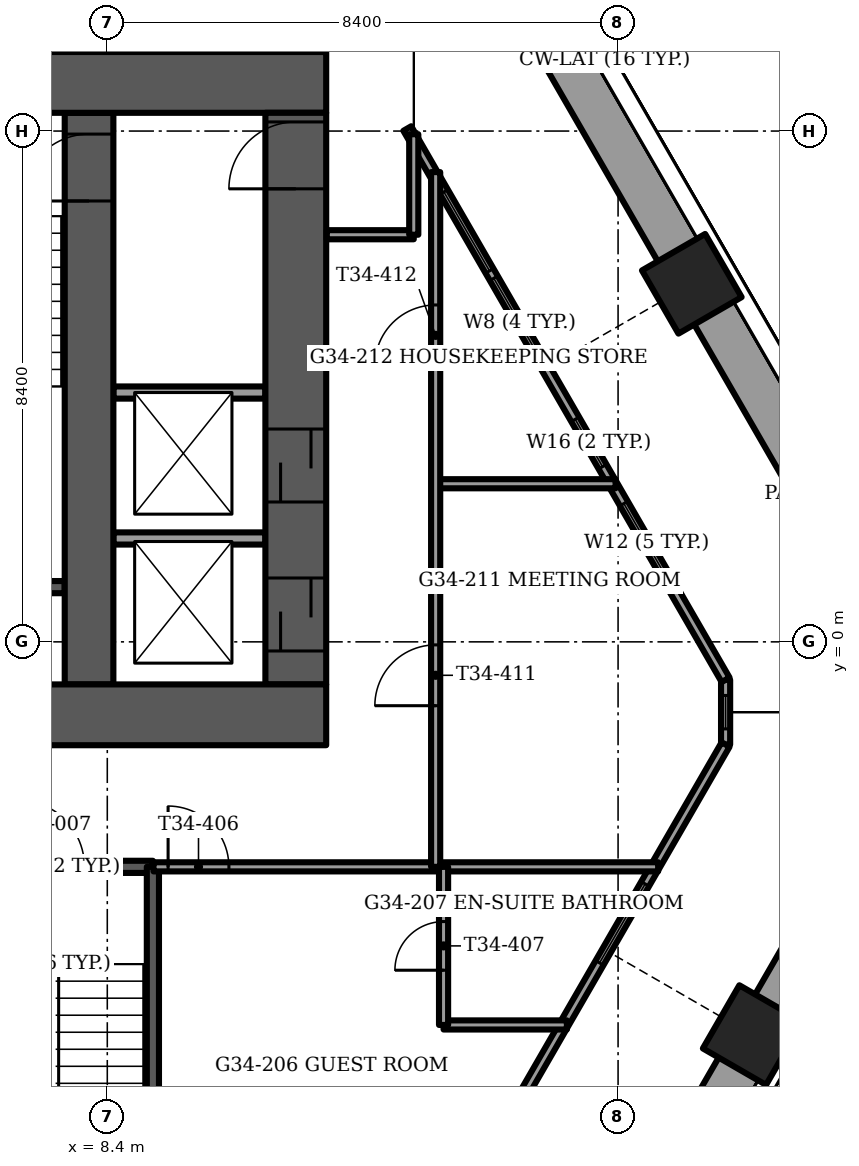
"""IFC4 building model, lengths in metres.
Left out: names, types, materials, properties, quantities, classifications, styles, units other than length and angle.
Written with IfcOpenShell. Run it as: python <this file> out.ifc"""

import sys

from ifc_helpers import new_model, si_unit, direction, frame, frame_2d, origin, origin_2d, place, context, subcontext, project, spatial, rectangle, extrude, element, fill, save


model = new_model("IFC4")
c1 = context("Model", 3, precision=1e-05, world=origin(), true_north=direction((0.0, 1.0)))
c2 = subcontext(c1, "Body", "Model", "MODEL_VIEW")
j1 = project(units=[si_unit("LENGTHUNIT", "METRE"), si_unit("PLANEANGLEUNIT", "RADIAN")], contexts=[c1])
p1 = place(None, origin())
s1 = spatial("IfcSite", under=j1, at=p1, CompositionType="ELEMENT")
p2 = place(p1, origin())
s2 = spatial("IfcBuilding", under=s1, at=p2, CompositionType="ELEMENT")
p3 = place(p2, frame((0.0, 0.0, 138.5)))
s3 = spatial("IfcBuildingStorey", under=s2, at=p3, CompositionType="ELEMENT", Elevation=138.5)
for number, where, z_axis, x_axis in (
    (1, (19.014, -6.467, -1.2), (0.0, 0.0, 1.0), (-0.5, -0.866, 0.0)),
    (2, (18.012, 5.888, -1.2), (0.0, 0.0, 1.0), (0.5, -0.866, 0.0)),
):
    element("IfcColumn", number, at=place(p3, frame(where, z_axis=z_axis, x_axis=x_axis)), inside=s3, PredefinedType="COLUMN", context=c2, shape_type="SweptSolid", body=[
        extrude(rectangle(XDim=1.2, YDim=1.2, at=origin_2d()), origin(), (0.0, 0.0, 1.0), 3.75),
    ])
p4 = place(p3, frame((-12.0, -1.2, -0.3), z_axis=(0.0, 0.0, 1.0), x_axis=(1.0, 0.0, 0.0)))
e3 = element("IfcWall", 3, at=p4, inside=s3, PredefinedType="SHEAR", context=c2, shape_type="SweptSolid", body=[
    extrude(rectangle(XDim=24.0, YDim=1.0, at=frame_2d((12.0, 0.0))), origin(), (0.0, 0.0, 1.0), 3.75),
])
p5 = place(p4, frame((11.2, 0.0, 0.0)))
e4 = element("IfcOpeningElement", 4, at=p5, cuts=e3, PredefinedType="OPENING", context=c2, shape_type="SweptSolid", body=[
    extrude(rectangle(XDim=1.6, YDim=2.1, at=frame_2d((0.8, 1.05))), frame((0.0, 0.5, 0.0), z_axis=(0.0, -1.0, 0.0), x_axis=(1.0, 0.0, 0.0)), (0.0, 0.0, 1.0), 1.0),
])
p6 = place(p3, frame((-12.0, 9.2, -0.3), z_axis=(0.0, 0.0, 1.0), x_axis=(1.0, 0.0, 0.0)))
e5 = element("IfcWall", 5, at=p6, inside=s3, PredefinedType="SHEAR", context=c2, shape_type="SweptSolid", body=[
    extrude(rectangle(XDim=24.0, YDim=1.0, at=frame_2d((12.0, 0.0))), origin(), (0.0, 0.0, 1.0), 3.75),
])
p7 = place(p6, frame((11.2, 0.0, 0.0)))
e6 = element("IfcOpeningElement", 6, at=p7, cuts=e5, PredefinedType="OPENING", context=c2, shape_type="SweptSolid", body=[
    extrude(rectangle(XDim=1.6, YDim=2.1, at=frame_2d((0.8, 1.05))), frame((0.0, 0.5, 0.0), z_axis=(0.0, -1.0, 0.0), x_axis=(1.0, 0.0, 0.0)), (0.0, 0.0, 1.0), 1.0),
])
p8 = place(p6, frame((5.25, 0.0, 0.0)))
e7 = element("IfcOpeningElement", 7, at=p8, cuts=e5, PredefinedType="OPENING", context=c2, shape_type="SweptSolid", body=[
    extrude(rectangle(XDim=1.1, YDim=2.1, at=frame_2d((0.55, 1.05))), frame((0.0, 0.5, 0.0), z_axis=(0.0, -1.0, 0.0), x_axis=(1.0, 0.0, 0.0)), (0.0, 0.0, 1.0), 1.0),
])
p9 = place(p6, frame((17.65, 0.0, 0.0)))
e8 = element("IfcOpeningElement", 8, at=p9, cuts=e5, PredefinedType="OPENING", context=c2, shape_type="SweptSolid", body=[
    extrude(rectangle(XDim=1.1, YDim=2.1, at=frame_2d((0.55, 1.05))), frame((0.0, 0.5, 0.0), z_axis=(0.0, -1.0, 0.0), x_axis=(1.0, 0.0, 0.0)), (0.0, 0.0, 1.0), 1.0),
])
p10 = place(p3, frame((8.1, -0.7, -0.3), z_axis=(0.0, 0.0, 1.0), x_axis=(0.0, 1.0, 0.0)))
e9 = element("IfcWall", 9, at=p10, inside=s3, PredefinedType="SHEAR", context=c2, shape_type="SweptSolid", body=[
    extrude(rectangle(XDim=9.4, YDim=0.8, at=frame_2d((4.7, 0.0))), origin(), (0.0, 0.0, 1.0), 3.75),
])
p11 = place(p10, frame((7.95, 0.0, 0.0)))
e10 = element("IfcOpeningElement", 10, at=p11, cuts=e9, PredefinedType="OPENING", context=c2, shape_type="SweptSolid", body=[
    extrude(rectangle(XDim=1.1, YDim=2.1, at=frame_2d((0.55, 1.05))), frame((0.0, 0.4, 0.0), z_axis=(0.0, -1.0, 0.0), x_axis=(1.0, 0.0, 0.0)), (0.0, 0.0, 1.0), 0.8),
])
p12 = place(p3, frame((11.5, -0.7, -0.3), z_axis=(0.0, 0.0, 1.0), x_axis=(0.0, 1.0, 0.0)))
e11 = element("IfcWall", 11, at=p12, inside=s3, PredefinedType="SHEAR", context=c2, shape_type="SweptSolid", body=[
    extrude(rectangle(XDim=9.4, YDim=1.0, at=frame_2d((4.7, 0.0))), origin(), (0.0, 0.0, 1.0), 3.75),
])
p13 = place(p12, frame((8.15, 0.0, 0.0)))
e12 = element("IfcOpeningElement", 12, at=p13, cuts=e11, PredefinedType="OPENING", context=c2, shape_type="SweptSolid", body=[
    extrude(rectangle(XDim=1.1, YDim=2.1, at=frame_2d((0.55, 1.05))), frame((0.0, 0.5, 0.0), z_axis=(0.0, -1.0, 0.0), x_axis=(1.0, 0.0, 0.0)), (0.0, 0.0, 1.0), 1.0),
])
p14 = place(p12, frame((0.55, 0.0, 0.0)))
e13 = element("IfcOpeningElement", 13, at=p14, cuts=e11, PredefinedType="OPENING", context=c2, shape_type="SweptSolid", body=[
    extrude(rectangle(XDim=1.2, YDim=2.1, at=frame_2d((0.6, 1.05))), frame((0.0, 0.5, 0.0), z_axis=(0.0, -1.0, 0.0), x_axis=(1.0, 0.0, 0.0)), (0.0, 0.0, 1.0), 1.0),
])
p15 = place(p12, frame((3.0, 0.0, 0.0)))
e14 = element("IfcOpeningElement", 14, at=p15, cuts=e11, PredefinedType="OPENING", context=c2, shape_type="SweptSolid", body=[
    extrude(rectangle(XDim=1.2, YDim=2.1, at=frame_2d((0.6, 1.05))), frame((0.0, 0.5, 0.0), z_axis=(0.0, -1.0, 0.0), x_axis=(1.0, 0.0, 0.0)), (0.0, 0.0, 1.0), 1.0),
])
p16 = place(p3, frame((15.522, -12.815, 0.0), z_axis=(0.0, 0.0, 1.0), x_axis=(0.499999023957, 0.866025967302, 0.0)))
e15 = element("IfcWall", 15, at=p16, inside=s3, PredefinedType="PARAPET", context=c2, shape_type="SweptSolid", body=[
    extrude(rectangle(XDim=6.673, YDim=0.9, at=frame_2d((3.337, 0.0))), origin(), (0.0, 0.0, 1.0), 1.1),
])
p17 = place(p3, frame((19.429, -6.048, 0.0), z_axis=(0.0, 0.0, 1.0), x_axis=(0.500011423449, 0.866018808352, 0.0)))
e16 = element("IfcWall", 16, at=p17, inside=s3, PredefinedType="PARAPET", context=c2, shape_type="SweptSolid", body=[
    extrude(rectangle(XDim=4.998, YDim=0.9, at=frame_2d((2.499, 0.0))), origin(), (0.0, 0.0, 1.0), 1.1),
])
p18 = place(p3, frame((21.928, -0.593, 0.0), z_axis=(0.0, 0.0, 1.0), x_axis=(-0.499991127072, 0.866030526511, 0.0)))
e17 = element("IfcWall", 17, at=p18, inside=s3, PredefinedType="PARAPET", context=c2, shape_type="SweptSolid", body=[
    extrude(rectangle(XDim=7.001, YDim=0.9, at=frame_2d((3.5, 0.0))), origin(), (0.0, 0.0, 1.0), 1.1),
])
p19 = place(p3, frame((17.857, 6.457, 0.0), z_axis=(0.0, 0.0, 1.0), x_axis=(-0.499983182885, 0.866035112932, 0.0)))
e18 = element("IfcWall", 18, at=p19, inside=s3, PredefinedType="PARAPET", context=c2, shape_type="SweptSolid", body=[
    extrude(rectangle(XDim=6.674, YDim=0.9, at=frame_2d((3.337, 0.0))), origin(), (0.0, 0.0, 1.0), 1.1),
])
p20 = place(p3, frame((13.334, -10.755, 0.0), z_axis=(0.0, 0.0, 1.0), x_axis=(0.499994317138, 0.866028684761, 0.0)))
e19 = element("IfcWall", 19, at=p20, inside=s3, PredefinedType="SOLIDWALL", context=c2, shape_type="SweptSolid", body=[
    extrude(rectangle(XDim=10.468, YDim=0.15, at=frame_2d((5.234, 0.0))), origin(), (0.0, 0.0, 1.0), 3.45),
])
p21 = place(p20, frame((0.847, 0.0, 0.15)))
e20 = element("IfcOpeningElement", 20, at=p21, cuts=e19, PredefinedType="OPENING", context=c2, shape_type="SweptSolid", body=[
    extrude(rectangle(XDim=1.7, YDim=2.2, at=frame_2d((0.85, 1.1))), frame((0.0, 0.075, 0.0), z_axis=(0.0, -1.0, 0.0), x_axis=(1.0, 0.0, 0.0)), (0.0, 0.0, 1.0), 0.15),
])
p22 = place(p20, frame((6.322, 0.0, 0.15)))
e21 = element("IfcOpeningElement", 21, at=p22, cuts=e19, PredefinedType="OPENING", context=c2, shape_type="SweptSolid", body=[
    extrude(rectangle(XDim=1.5, YDim=2.2, at=frame_2d((0.75, 1.1))), frame((0.0, 0.075, 0.0), z_axis=(0.0, -1.0, 0.0), x_axis=(1.0, 0.0, 0.0)), (0.0, 0.0, 1.0), 0.15),
])
p23 = place(p3, frame((18.568, -0.624, 0.0), z_axis=(0.0, 0.0, 1.0), x_axis=(-0.499994317138, 0.866028684761, 0.0)))
e22 = element("IfcWall", 22, at=p23, inside=s3, PredefinedType="SOLIDWALL", context=c2, shape_type="SweptSolid", body=[
    extrude(rectangle(XDim=10.468, YDim=0.15, at=frame_2d((5.234, 0.0))), origin(), (0.0, 0.0, 1.0), 3.45),
])
p24 = place(p23, frame((4.047, 0.0, 0.15)))
e23 = element("IfcOpeningElement", 23, at=p24, cuts=e22, PredefinedType="OPENING", context=c2, shape_type="SweptSolid", body=[
    extrude(rectangle(XDim=0.9, YDim=2.2, at=frame_2d((0.45, 1.1))), frame((0.0, 0.075, 0.0), z_axis=(0.0, -1.0, 0.0), x_axis=(1.0, 0.0, 0.0)), (0.0, 0.0, 1.0), 0.15),
])
p25 = place(p23, frame((1.847, 0.0, 0.15)))
e24 = element("IfcOpeningElement", 24, at=p25, cuts=e22, PredefinedType="OPENING", context=c2, shape_type="SweptSolid", body=[
    extrude(rectangle(XDim=1.5, YDim=2.2, at=frame_2d((0.75, 1.1))), frame((0.0, 0.075, 0.0), z_axis=(0.0, -1.0, 0.0), x_axis=(1.0, 0.0, 0.0)), (0.0, 0.0, 1.0), 0.15),
])
p26 = place(p23, frame((5.925, 0.0, 0.15)))
e25 = element("IfcOpeningElement", 25, at=p26, cuts=e22, PredefinedType="OPENING", context=c2, shape_type="SweptSolid", body=[
    extrude(rectangle(XDim=1.7, YDim=2.2, at=frame_2d((0.85, 1.1))), frame((0.0, 0.075, 0.0), z_axis=(0.0, -1.0, 0.0), x_axis=(1.0, 0.0, 0.0)), (0.0, 0.0, 1.0), 0.15),
])
p27 = place(p23, frame((7.764, 0.0, 0.15)))
e26 = element("IfcOpeningElement", 26, at=p27, cuts=e22, PredefinedType="OPENING", context=c2, shape_type="SweptSolid", body=[
    extrude(rectangle(XDim=1.5, YDim=2.2, at=frame_2d((0.75, 1.1))), frame((0.0, 0.075, 0.0), z_axis=(0.0, -1.0, 0.0), x_axis=(1.0, 0.0, 0.0)), (0.0, 0.0, 1.0), 0.15),
])
p28 = place(p3, frame((18.568, -1.689, 0.0), z_axis=(0.0, 0.0, 1.0), x_axis=(0.0, 1.0, 0.0)))
e27 = element("IfcWall", 27, at=p28, inside=s3, PredefinedType="SOLIDWALL", context=c2, shape_type="SweptSolid", body=[
    extrude(rectangle(XDim=1.065, YDim=0.15, at=frame_2d((0.532, 0.0))), origin(), (0.0, 0.0, 1.0), 3.45),
])
p29 = place(p28, frame((0.258, 0.0, 0.15)))
e28 = element("IfcOpeningElement", 28, at=p29, cuts=e27, PredefinedType="OPENING", context=c2, shape_type="SweptSolid", body=[
    extrude(rectangle(XDim=0.55, YDim=2.2, at=frame_2d((0.275, 1.1))), frame((0.0, 0.075, 0.0), z_axis=(0.0, -1.0, 0.0), x_axis=(1.0, 0.0, 0.0)), (0.0, 0.0, 1.0), 0.15),
])
p30 = place(p3, frame((4.45, 0.9, -0.3), z_axis=(0.0, 0.0, 1.0), x_axis=(1.0, 0.0, 0.0)))
e29 = element("IfcWall", 29, at=p30, inside=s3, PredefinedType="SOLIDWALL", context=c2, shape_type="SweptSolid", body=[
    extrude(rectangle(XDim=3.25, YDim=0.2, at=frame_2d((1.625, 0.0))), origin(), (0.0, 0.0, 1.0), 3.75),
])
p31 = place(p3, frame((5.8, -3.7, -0.3), z_axis=(0.0, 0.0, 1.0), x_axis=(1.0, 0.0, 0.0)))
e30 = element("IfcWall", 30, at=p31, inside=s3, PredefinedType="SOLIDWALL", context=c2, shape_type="SweptSolid", body=[
    extrude(rectangle(XDim=3.35, YDim=0.2, at=frame_2d((1.675, 0.0))), origin(), (0.0, 0.0, 1.0), 3.75),
])
p32 = place(p31, frame((1.125, 0.0, 0.0)))
e31 = element("IfcOpeningElement", 31, at=p32, cuts=e30, PredefinedType="OPENING", context=c2, shape_type="SweptSolid", body=[
    extrude(rectangle(XDim=1.1, YDim=2.1, at=frame_2d((0.55, 1.05))), frame((0.0, 0.1, 0.0), z_axis=(0.0, -1.0, 0.0), x_axis=(1.0, 0.0, 0.0)), (0.0, 0.0, 1.0), 0.2),
])
p33 = place(p3, frame((9.15, -3.7, -0.3), z_axis=(0.0, 0.0, 1.0), x_axis=(0.0, -1.0, 0.0)))
e32 = element("IfcWall", 32, at=p33, inside=s3, PredefinedType="SOLIDWALL", context=c2, shape_type="SweptSolid", body=[
    extrude(rectangle(XDim=7.7, YDim=0.2, at=frame_2d((3.85, 0.0))), origin(), (0.0, 0.0, 1.0), 3.75),
])
for number, where, z_axis, x_axis in (
    (33, (8.5, 1.7, 0.0), (0.0, 0.0, 1.0), (1.0, 0.0, 0.0)),
    (34, (8.5, 4.1, 0.0), (0.0, 0.0, 1.0), (1.0, 0.0, 0.0)),
):
    element("IfcWall", number, at=place(p3, frame(where, z_axis=z_axis, x_axis=x_axis)), inside=s3, PredefinedType="PARTITIONING", context=c2, shape_type="SweptSolid", body=[
        extrude(rectangle(XDim=2.5, YDim=0.2, at=frame_2d((1.25, 0.0))), origin(), (0.0, 0.0, 1.0), 3.45),
    ])
p34 = place(p3, frame((13.93, -6.3, 0.0), z_axis=(0.0, 0.0, 1.0), x_axis=(1.0, 0.0, 0.0)))
e35 = element("IfcWall", 35, at=p34, inside=s3, PredefinedType="PARTITIONING", context=c2, shape_type="SweptSolid", body=[
    extrude(rectangle(XDim=2.028, YDim=0.15, at=frame_2d((1.014, 0.0))), origin(), (0.0, 0.0, 1.0), 3.45),
])
p35 = place(p3, frame((9.16, -3.7, 0.0), z_axis=(0.0, 0.0, 1.0), x_axis=(1.0, 0.0, 0.0)))
e36 = element("IfcWall", 36, at=p35, inside=s3, PredefinedType="PARTITIONING", context=c2, shape_type="SweptSolid", body=[
    extrude(rectangle(XDim=8.299, YDim=0.15, at=frame_2d((4.149, 0.0))), origin(), (0.0, 0.0, 1.0), 3.45),
])
p36 = place(p35, frame((0.24, 0.0, 0.0)))
e37 = element("IfcOpeningElement", 37, at=p36, cuts=e36, PredefinedType="OPENING", context=c2, shape_type="SweptSolid", body=[
    extrude(rectangle(XDim=1.0, YDim=2.1, at=frame_2d((0.5, 1.05))), frame((0.0, 0.075, 0.0), z_axis=(0.0, -1.0, 0.0), x_axis=(1.0, 0.0, 0.0)), (0.0, 0.0, 1.0), 0.15),
])
p37 = place(p3, frame((13.8, 2.6, 0.0), z_axis=(0.0, 0.0, 1.0), x_axis=(1.0, 0.0, 0.0)))
e38 = element("IfcWall", 38, at=p37, inside=s3, PredefinedType="PARTITIONING", context=c2, shape_type="SweptSolid", body=[
    extrude(rectangle(XDim=2.959, YDim=0.15, at=frame_2d((1.479, 0.0))), origin(), (0.0, 0.0, 1.0), 3.45),
])
p38 = place(p3, frame((12.01, 6.695, 0.0), z_axis=(0.0, 0.0, 1.0), x_axis=(1.0, 0.0, 0.0)))
e39 = element("IfcWall", 39, at=p38, inside=s3, PredefinedType="PARTITIONING", context=c2, shape_type="SweptSolid", body=[
    extrude(rectangle(XDim=1.43, YDim=0.15, at=frame_2d((0.715, 0.0))), origin(), (0.0, 0.0, 1.0), 3.45),
])
p39 = place(p3, frame((13.93, -6.3, 0.0), z_axis=(0.0, 0.0, 1.0), x_axis=(0.0, 1.0, 0.0)))
e40 = element("IfcWall", 40, at=p39, inside=s3, PredefinedType="PARTITIONING", context=c2, shape_type="SweptSolid", body=[
    extrude(rectangle(XDim=2.6, YDim=0.15, at=frame_2d((1.3, 0.0))), origin(), (0.0, 0.0, 1.0), 3.45),
])
p40 = place(p39, frame((0.9, 0.0, 0.0)))
e41 = element("IfcOpeningElement", 41, at=p40, cuts=e40, PredefinedType="OPENING", context=c2, shape_type="SweptSolid", body=[
    extrude(rectangle(XDim=0.8, YDim=2.1, at=frame_2d((0.4, 1.05))), frame((0.0, 0.075, 0.0), z_axis=(0.0, -1.0, 0.0), x_axis=(1.0, 0.0, 0.0)), (0.0, 0.0, 1.0), 0.15),
])
p41 = place(p3, frame((13.8, -3.7, 0.0), z_axis=(0.0, 0.0, 1.0), x_axis=(0.0, 1.0, 0.0)))
e42 = element("IfcWall", 42, at=p41, inside=s3, PredefinedType="PARTITIONING", context=c2, shape_type="SweptSolid", body=[
    extrude(rectangle(XDim=11.425, YDim=0.15, at=frame_2d((5.712, 0.0))), origin(), (0.0, 0.0, 1.0), 3.45),
])
p42 = place(p41, frame((2.65, 0.0, 0.0)))
e43 = element("IfcOpeningElement", 43, at=p42, cuts=e42, PredefinedType="OPENING", context=c2, shape_type="SweptSolid", body=[
    extrude(rectangle(XDim=1.0, YDim=2.1, at=frame_2d((0.5, 1.05))), frame((0.0, 0.075, 0.0), z_axis=(0.0, -1.0, 0.0), x_axis=(1.0, 0.0, 0.0)), (0.0, 0.0, 1.0), 0.15),
])
p43 = place(p41, frame((8.24, 0.0, 0.0)))
e44 = element("IfcOpeningElement", 44, at=p43, cuts=e42, PredefinedType="OPENING", context=c2, shape_type="SweptSolid", body=[
    extrude(rectangle(XDim=1.0, YDim=2.1, at=frame_2d((0.5, 1.05))), frame((0.0, 0.075, 0.0), z_axis=(0.0, -1.0, 0.0), x_axis=(1.0, 0.0, 0.0)), (0.0, 0.0, 1.0), 0.15),
])
p44 = place(p3, frame((13.44, 6.695, 0.0), z_axis=(0.0, 0.0, 1.0), x_axis=(0.0, 1.0, 0.0)))
e45 = element("IfcWall", 45, at=p44, inside=s3, PredefinedType="PARTITIONING", context=c2, shape_type="SweptSolid", body=[
    extrude(rectangle(XDim=1.653, YDim=0.15, at=frame_2d((0.826, 0.0))), origin(), (0.0, 0.0, 1.0), 3.45),
])
p45 = place(p22, origin())
e46 = element("IfcWindow", 46, at=p45, inside=s3, PartitioningType="SINGLE_PANEL", PredefinedType="WINDOW", context=c2, shape_type="SweptSolid", body=[
    extrude(rectangle(XDim=1.5, YDim=2.2, at=frame_2d((0.75, 1.1))), frame((0.0, 0.03, 0.0), z_axis=(0.0, -1.0, 0.0), x_axis=(1.0, 0.0, 0.0)), (0.0, 0.0, 1.0), 0.06),
])
fill(e21, e46)
p46 = place(p24, origin())
e47 = element("IfcWindow", 47, at=p46, inside=s3, PartitioningType="SINGLE_PANEL", PredefinedType="WINDOW", context=c2, shape_type="SweptSolid", body=[
    extrude(rectangle(XDim=0.9, YDim=2.2, at=frame_2d((0.45, 1.1))), frame((0.0, 0.03, 0.0), z_axis=(0.0, -1.0, 0.0), x_axis=(1.0, 0.0, 0.0)), (0.0, 0.0, 1.0), 0.06),
])
fill(e23, e47)
p47 = place(p25, origin())
e48 = element("IfcWindow", 48, at=p47, inside=s3, PartitioningType="SINGLE_PANEL", PredefinedType="WINDOW", context=c2, shape_type="SweptSolid", body=[
    extrude(rectangle(XDim=1.5, YDim=2.2, at=frame_2d((0.75, 1.1))), frame((0.0, 0.03, 0.0), z_axis=(0.0, -1.0, 0.0), x_axis=(1.0, 0.0, 0.0)), (0.0, 0.0, 1.0), 0.06),
])
fill(e24, e48)
p48 = place(p26, origin())
e49 = element("IfcWindow", 49, at=p48, inside=s3, PartitioningType="SINGLE_PANEL", PredefinedType="WINDOW", context=c2, shape_type="SweptSolid", body=[
    extrude(rectangle(XDim=1.7, YDim=2.2, at=frame_2d((0.85, 1.1))), frame((0.0, 0.03, 0.0), z_axis=(0.0, -1.0, 0.0), x_axis=(1.0, 0.0, 0.0)), (0.0, 0.0, 1.0), 0.06),
])
fill(e25, e49)
p49 = place(p27, origin())
e50 = element("IfcWindow", 50, at=p49, inside=s3, PartitioningType="SINGLE_PANEL", PredefinedType="WINDOW", context=c2, shape_type="SweptSolid", body=[
    extrude(rectangle(XDim=1.5, YDim=2.2, at=frame_2d((0.75, 1.1))), frame((0.0, 0.03, 0.0), z_axis=(0.0, -1.0, 0.0), x_axis=(1.0, 0.0, 0.0)), (0.0, 0.0, 1.0), 0.06),
])
fill(e26, e50)
p50 = place(p29, origin())
e51 = element("IfcWindow", 51, at=p50, inside=s3, PartitioningType="SINGLE_PANEL", PredefinedType="WINDOW", context=c2, shape_type="SweptSolid", body=[
    extrude(rectangle(XDim=0.55, YDim=2.2, at=frame_2d((0.275, 1.1))), frame((0.0, 0.03, 0.0), z_axis=(0.0, -1.0, 0.0), x_axis=(1.0, 0.0, 0.0)), (0.0, 0.0, 1.0), 0.06),
])
fill(e28, e51)
p51 = place(p11, origin())
e52 = element("IfcDoor", 52, at=p51, inside=s3, OperationType="SINGLE_SWING_LEFT", PredefinedType="DOOR", context=c2, shape_type="SweptSolid", body=[
    extrude(rectangle(XDim=1.1, YDim=2.1, at=frame_2d((0.55, 1.05))), frame((0.0, 0.025, 0.0), z_axis=(0.0, -1.0, 0.0), x_axis=(1.0, 0.0, 0.0)), (0.0, 0.0, 1.0), 0.05),
])
fill(e10, e52)
p52 = place(p32, origin())
e53 = element("IfcDoor", 53, at=p52, inside=s3, OperationType="SINGLE_SWING_LEFT", PredefinedType="DOOR", context=c2, shape_type="SweptSolid", body=[
    extrude(rectangle(XDim=1.1, YDim=2.1, at=frame_2d((0.55, 1.05))), frame((0.0, 0.025, 0.0), z_axis=(0.0, -1.0, 0.0), x_axis=(1.0, 0.0, 0.0)), (0.0, 0.0, 1.0), 0.05),
])
fill(e31, e53)
p53 = place(p13, origin())
e54 = element("IfcDoor", 54, at=p53, inside=s3, OperationType="SINGLE_SWING_RIGHT", PredefinedType="DOOR", context=c2, shape_type="SweptSolid", body=[
    extrude(rectangle(XDim=1.1, YDim=2.1, at=frame_2d((0.55, 1.05))), frame((0.0, 0.025, 0.0), z_axis=(0.0, -1.0, 0.0), x_axis=(1.0, 0.0, 0.0)), (0.0, 0.0, 1.0), 0.05),
])
fill(e12, e54)
p54 = place(p14, origin())
e55 = element("IfcDoor", 55, at=p54, inside=s3, OperationType="SLIDING_TO_LEFT", PredefinedType="DOOR", context=c2, shape_type="SweptSolid", body=[
    extrude(rectangle(XDim=1.2, YDim=2.1, at=frame_2d((0.6, 1.05))), frame((0.0, 0.025, 0.0), z_axis=(0.0, -1.0, 0.0), x_axis=(1.0, 0.0, 0.0)), (0.0, 0.0, 1.0), 0.05),
])
fill(e13, e55)
p55 = place(p15, origin())
e56 = element("IfcDoor", 56, at=p55, inside=s3, OperationType="SLIDING_TO_LEFT", PredefinedType="DOOR", context=c2, shape_type="SweptSolid", body=[
    extrude(rectangle(XDim=1.2, YDim=2.1, at=frame_2d((0.6, 1.05))), frame((0.0, 0.025, 0.0), z_axis=(0.0, -1.0, 0.0), x_axis=(1.0, 0.0, 0.0)), (0.0, 0.0, 1.0), 0.05),
])
fill(e14, e56)
p56 = place(p36, origin())
e57 = element("IfcDoor", 57, at=p56, inside=s3, OperationType="SINGLE_SWING_LEFT", PredefinedType="DOOR", context=c2, shape_type="SweptSolid", body=[
    extrude(rectangle(XDim=1.0, YDim=2.1, at=frame_2d((0.5, 1.05))), frame((0.0, 0.025, 0.0), z_axis=(0.0, -1.0, 0.0), x_axis=(1.0, 0.0, 0.0)), (0.0, 0.0, 1.0), 0.05),
])
fill(e37, e57)
p57 = place(p40, origin())
e58 = element("IfcDoor", 58, at=p57, inside=s3, OperationType="SINGLE_SWING_RIGHT", PredefinedType="DOOR", context=c2, shape_type="SweptSolid", body=[
    extrude(rectangle(XDim=0.8, YDim=2.1, at=frame_2d((0.4, 1.05))), frame((0.0, 0.025, 0.0), z_axis=(0.0, -1.0, 0.0), x_axis=(1.0, 0.0, 0.0)), (0.0, 0.0, 1.0), 0.05),
])
fill(e41, e58)
p58 = place(p42, origin())
e59 = element("IfcDoor", 59, at=p58, inside=s3, OperationType="SINGLE_SWING_RIGHT", PredefinedType="DOOR", context=c2, shape_type="SweptSolid", body=[
    extrude(rectangle(XDim=1.0, YDim=2.1, at=frame_2d((0.5, 1.05))), frame((0.0, 0.025, 0.0), z_axis=(0.0, -1.0, 0.0), x_axis=(1.0, 0.0, 0.0)), (0.0, 0.0, 1.0), 0.05),
])
fill(e43, e59)
p59 = place(p43, origin())
e60 = element("IfcDoor", 60, at=p59, inside=s3, OperationType="SINGLE_SWING_LEFT", PredefinedType="DOOR", context=c2, shape_type="SweptSolid", body=[
    extrude(rectangle(XDim=1.0, YDim=2.1, at=frame_2d((0.5, 1.05))), frame((0.0, 0.025, 0.0), z_axis=(0.0, -1.0, 0.0), x_axis=(1.0, 0.0, 0.0)), (0.0, 0.0, 1.0), 0.05),
])
fill(e44, e60)
save(model, sys.argv[1])
